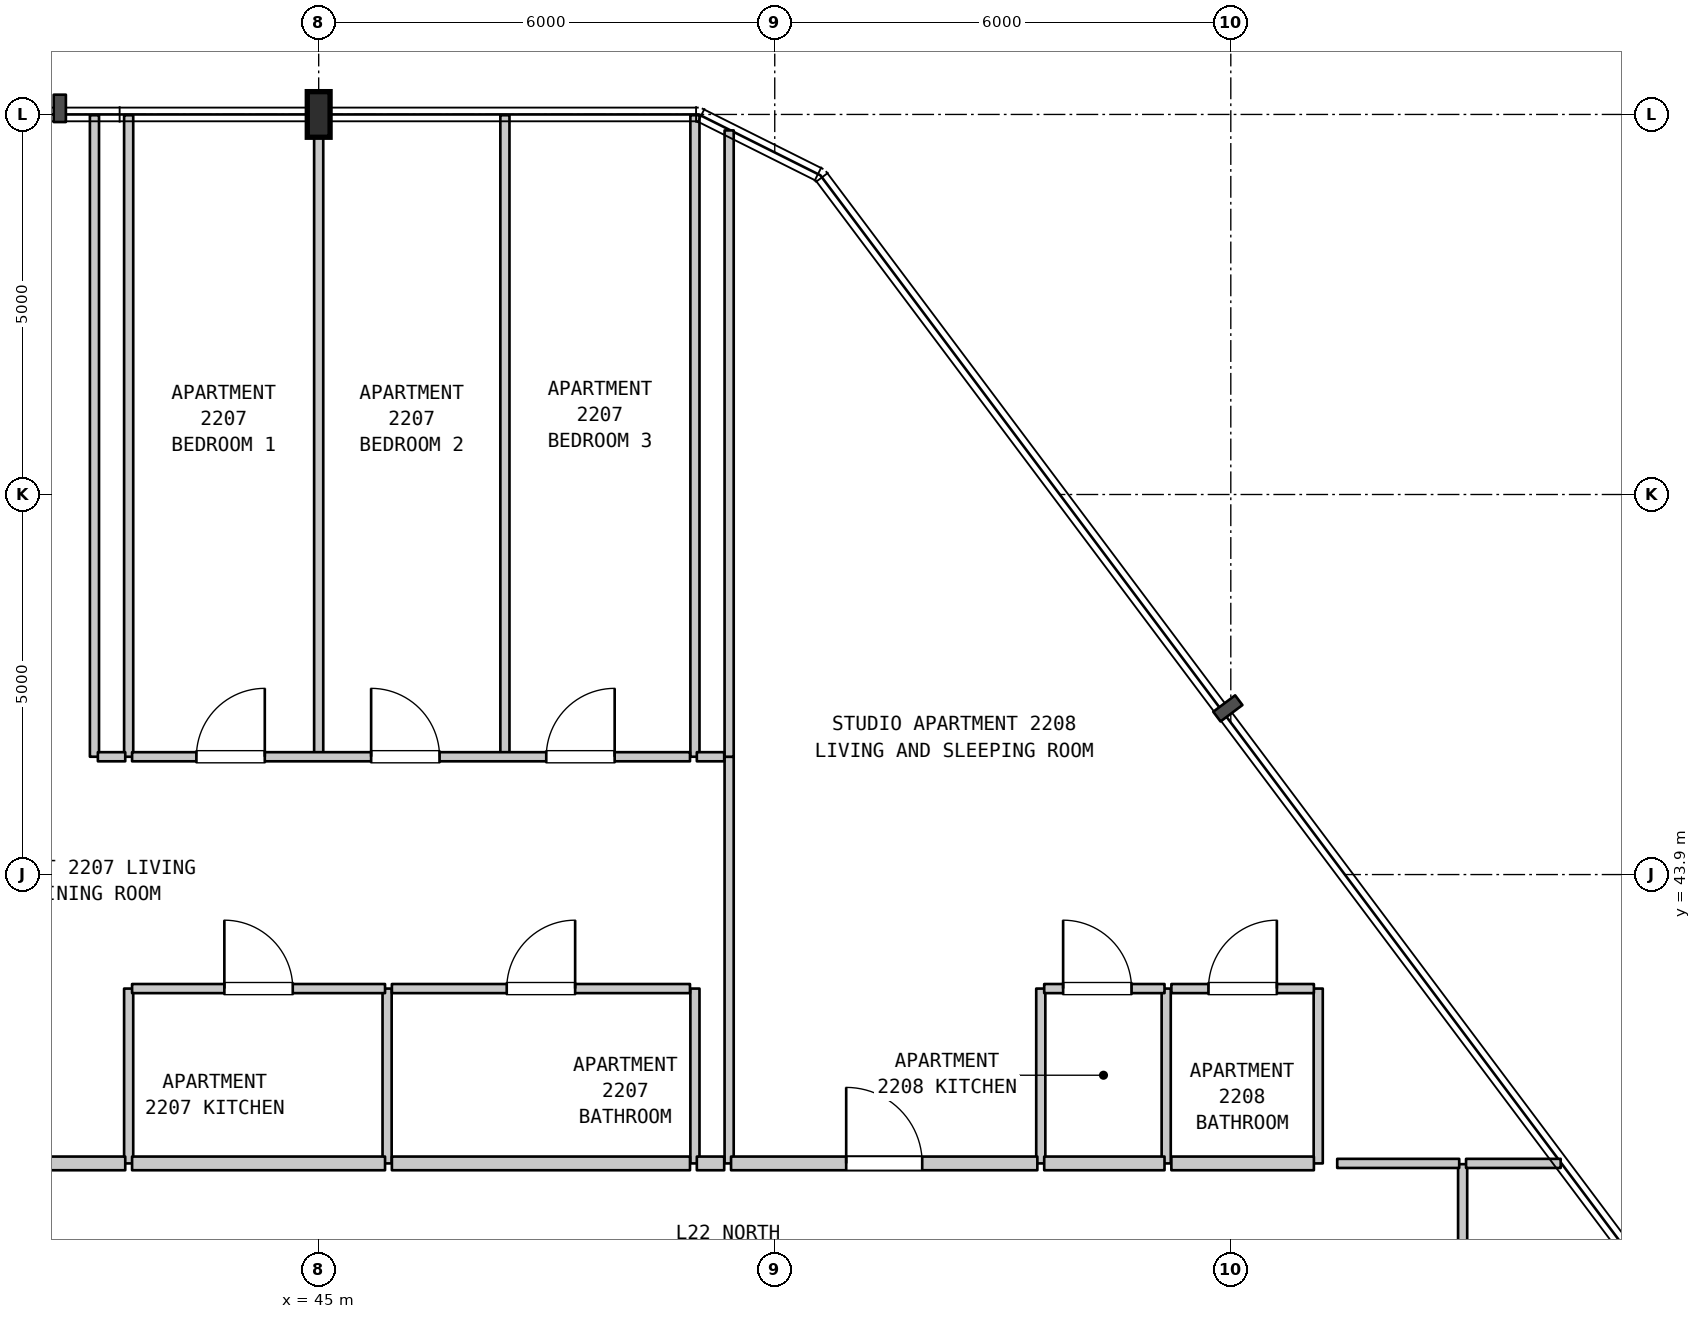
"""IFC4 building model, lengths in metres.
Left out: names, types, materials, properties, quantities, classifications, styles, units other than length and angle.
Written with IfcOpenShell. Run it as: python <this file> out.ifc"""

import sys

from ifc_helpers import new_model, si_unit, direction, frame, frame_2d, origin, origin_2d, place, context, subcontext, project, spatial, rectangle, i_section, extrude, element, fill, save


model = new_model("IFC4")
c1 = context("Model", 3, precision=1e-05, world=origin(), true_north=direction((0.0, 1.0)))
c2 = subcontext(c1, "Body", "Model", "MODEL_VIEW")
j1 = project(units=[si_unit("LENGTHUNIT", "METRE"), si_unit("PLANEANGLEUNIT", "RADIAN")], contexts=[c1])
p1 = place(None, origin())
s1 = spatial("IfcSite", under=j1, at=p1, CompositionType="ELEMENT")
p2 = place(p1, origin())
s2 = spatial("IfcBuilding", under=s1, at=p2, CompositionType="ELEMENT")
p3 = place(p2, frame((0.0, 0.0, 94.6)))
s3 = spatial("IfcBuildingStorey", under=s2, at=p3, CompositionType="ELEMENT", Elevation=94.6)
p4 = place(p3, frame((45.0, 53.9, 0.0), z_axis=(0.0, 0.0, 1.0), x_axis=(1.0, 0.0, 0.0)))
e1 = element("IfcColumn", 1, at=p4, inside=s3, PredefinedType="COLUMN", context=c2, shape_type="SweptSolid", body=[
    extrude(i_section(OverallWidth=0.3, OverallDepth=0.6, WebThickness=0.015, FlangeThickness=0.03, FilletRadius=0.027, at=origin_2d()), origin(), (0.0, 0.0, 1.0), 3.7),
])
p5 = place(p3, frame((42.05, 45.45, 0.0), z_axis=(0.0, 0.0, 1.0), x_axis=(0.0, 1.0, 0.0)))
e2 = element("IfcWall", 2, at=p5, inside=s3, PredefinedType="PARTITIONING", context=c2, shape_type="SweptSolid", body=[
    extrude(rectangle(XDim=8.44, YDim=0.12, at=frame_2d((4.22, 0.0))), origin(), (0.0, 0.0, 1.0), 3.385),
])
p6 = place(p3, frame((42.5, 40.1, 0.0), z_axis=(0.0, 0.0, 1.0), x_axis=(0.0, 1.0, 0.0)))
e3 = element("IfcWall", 3, at=p6, inside=s3, PredefinedType="PARTITIONING", context=c2, shape_type="SweptSolid", body=[
    extrude(rectangle(XDim=2.3, YDim=0.12, at=frame_2d((1.15, 0.0))), origin(), (0.0, 0.0, 1.0), 3.385),
])
for number, where, z_axis, x_axis in (
    (4, (42.5, 45.45, 0.0), (0.0, 0.0, 1.0), (0.0, 1.0, 0.0)),
    (5, (45.0, 45.45, 0.0), (0.0, 0.0, 1.0), (0.0, 1.0, 0.0)),
):
    element("IfcWall", number, at=place(p3, frame(where, z_axis=z_axis, x_axis=x_axis)), inside=s3, PredefinedType="PARTITIONING", context=c2, shape_type="SweptSolid", body=[
        extrude(rectangle(XDim=8.44, YDim=0.12, at=frame_2d((4.22, 0.0))), origin(), (0.0, 0.0, 1.0), 3.385),
    ])
p7 = place(p3, frame((45.9, 40.1, 0.0), z_axis=(0.0, 0.0, 1.0), x_axis=(0.0, 1.0, 0.0)))
e6 = element("IfcWall", 6, at=p7, inside=s3, PredefinedType="PARTITIONING", context=c2, shape_type="SweptSolid", body=[
    extrude(rectangle(XDim=2.3, YDim=0.12, at=frame_2d((1.15, 0.0))), origin(), (0.0, 0.0, 1.0), 3.385),
])
p8 = place(p3, frame((47.45, 45.45, 0.0), z_axis=(0.0, 0.0, 1.0), x_axis=(0.0, 1.0, 0.0)))
e7 = element("IfcWall", 7, at=p8, inside=s3, PredefinedType="PARTITIONING", context=c2, shape_type="SweptSolid", body=[
    extrude(rectangle(XDim=8.44, YDim=0.12, at=frame_2d((4.22, 0.0))), origin(), (0.0, 0.0, 1.0), 3.385),
])
p9 = place(p3, frame((49.95, 40.1, 0.0), z_axis=(0.0, 0.0, 1.0), x_axis=(0.0, 1.0, 0.0)))
e8 = element("IfcWall", 8, at=p9, inside=s3, PredefinedType="PARTITIONING", context=c2, shape_type="SweptSolid", body=[
    extrude(rectangle(XDim=2.3, YDim=0.12, at=frame_2d((1.15, 0.0))), origin(), (0.0, 0.0, 1.0), 3.385),
])
p10 = place(p3, frame((49.95, 45.45, 0.0), z_axis=(0.0, 0.0, 1.0), x_axis=(0.0, 1.0, 0.0)))
e9 = element("IfcWall", 9, at=p10, inside=s3, PredefinedType="PARTITIONING", context=c2, shape_type="SweptSolid", body=[
    extrude(rectangle(XDim=8.44, YDim=0.12, at=frame_2d((4.22, 0.0))), origin(), (0.0, 0.0, 1.0), 3.385),
])
p11 = place(p3, frame((50.4, 40.1, 0.0), z_axis=(0.0, 0.0, 1.0), x_axis=(0.0, 1.0, 0.0)))
e10 = element("IfcWall", 10, at=p11, inside=s3, PredefinedType="PARTITIONING", context=c2, shape_type="SweptSolid", body=[
    extrude(rectangle(XDim=5.35, YDim=0.12, at=frame_2d((2.675, 0.0))), origin(), (0.0, 0.0, 1.0), 3.385),
])
p12 = place(p3, frame((50.4, 45.45, 0.0), z_axis=(0.0, 0.0, 1.0), x_axis=(0.0, 1.0, 0.0)))
e11 = element("IfcWall", 11, at=p12, inside=s3, PredefinedType="PARTITIONING", context=c2, shape_type="SweptSolid", body=[
    extrude(rectangle(XDim=8.24, YDim=0.12, at=frame_2d((4.12, 0.0))), origin(), (0.0, 0.0, 1.0), 3.385),
])
for number, where, z_axis, x_axis in (
    (12, (54.5, 40.1, 0.0), (0.0, 0.0, 1.0), (0.0, 1.0, 0.0)),
    (13, (56.15, 40.1, 0.0), (0.0, 0.0, 1.0), (0.0, 1.0, 0.0)),
    (14, (58.15, 40.1, 0.0), (0.0, 0.0, 1.0), (0.0, 1.0, 0.0)),
):
    element("IfcWall", number, at=place(p3, frame(where, z_axis=z_axis, x_axis=x_axis)), inside=s3, PredefinedType="PARTITIONING", context=c2, shape_type="SweptSolid", body=[
        extrude(rectangle(XDim=2.3, YDim=0.12, at=frame_2d((1.15, 0.0))), origin(), (0.0, 0.0, 1.0), 3.385),
    ])
p13 = place(p3, frame((60.05, 37.89, 0.0), z_axis=(0.0, 0.0, 1.0), x_axis=(0.0, 1.0, 0.0)))
e15 = element("IfcWall", 15, at=p13, inside=s3, PredefinedType="PARTITIONING", context=c2, shape_type="SweptSolid", body=[
    extrude(rectangle(XDim=2.2, YDim=0.12, at=frame_2d((1.1, 0.0))), origin(), (0.0, 0.0, 1.0), 3.385),
])
p14 = place(p3, frame((37.155, 40.1, 0.0), z_axis=(0.0, 0.0, 1.0), x_axis=(1.0, 0.0, 0.0)))
e16 = element("IfcWall", 16, at=p14, inside=s3, PredefinedType="STANDARD", context=c2, shape_type="SweptSolid", body=[
    extrude(rectangle(XDim=5.3, YDim=0.18, at=frame_2d((2.65, 0.0))), origin(), (0.0, 0.0, 1.0), 3.385),
])
p15 = place(p14, frame((2.15, 0.0, 0.0)))
e17 = element("IfcOpeningElement", 17, at=p15, cuts=e16, PredefinedType="OPENING", context=c2, shape_type="SweptSolid", body=[
    extrude(rectangle(XDim=1.0, YDim=2.15, at=frame_2d((0.5, 1.075))), frame((0.0, 0.1, 0.0), z_axis=(0.0, -1.0, 0.0), x_axis=(1.0, 0.0, 0.0)), (0.0, 0.0, 1.0), 0.2),
])
p16 = place(p3, frame((42.545, 40.1, 0.0), z_axis=(0.0, 0.0, 1.0), x_axis=(1.0, 0.0, 0.0)))
e18 = element("IfcWall", 18, at=p16, inside=s3, PredefinedType="STANDARD", context=c2, shape_type="SweptSolid", body=[
    extrude(rectangle(XDim=3.328, YDim=0.18, at=frame_2d((1.664, 0.0))), origin(), (0.0, 0.0, 1.0), 3.385),
])
p17 = place(p3, frame((45.963, 40.1, 0.0), z_axis=(0.0, 0.0, 1.0), x_axis=(1.0, 0.0, 0.0)))
e19 = element("IfcWall", 19, at=p17, inside=s3, PredefinedType="STANDARD", context=c2, shape_type="SweptSolid", body=[
    extrude(rectangle(XDim=3.922, YDim=0.18, at=frame_2d((1.961, 0.0))), origin(), (0.0, 0.0, 1.0), 3.385),
])
p18 = place(p3, frame((49.975, 40.1, 0.0), z_axis=(0.0, 0.0, 1.0), x_axis=(1.0, 0.0, 0.0)))
e20 = element("IfcWall", 20, at=p18, inside=s3, PredefinedType="STANDARD", context=c2, shape_type="SweptSolid", body=[
    extrude(rectangle(XDim=0.36, YDim=0.18, at=frame_2d((0.18, 0.0))), origin(), (0.0, 0.0, 1.0), 3.385),
])
p19 = place(p3, frame((50.425, 40.1, 0.0), z_axis=(0.0, 0.0, 1.0), x_axis=(1.0, 0.0, 0.0)))
e21 = element("IfcWall", 21, at=p19, inside=s3, PredefinedType="STANDARD", context=c2, shape_type="SweptSolid", body=[
    extrude(rectangle(XDim=4.03, YDim=0.18, at=frame_2d((2.015, 0.0))), origin(), (0.0, 0.0, 1.0), 3.385),
])
p20 = place(p19, frame((1.515, 0.0, 0.0)))
e22 = element("IfcOpeningElement", 22, at=p20, cuts=e21, PredefinedType="OPENING", context=c2, shape_type="SweptSolid", body=[
    extrude(rectangle(XDim=1.0, YDim=2.15, at=frame_2d((0.5, 1.075))), frame((0.0, 0.1, 0.0), z_axis=(0.0, -1.0, 0.0), x_axis=(1.0, 0.0, 0.0)), (0.0, 0.0, 1.0), 0.2),
])
p21 = place(p3, frame((54.545, 40.1, 0.0), z_axis=(0.0, 0.0, 1.0), x_axis=(1.0, 0.0, 0.0)))
e23 = element("IfcWall", 23, at=p21, inside=s3, PredefinedType="STANDARD", context=c2, shape_type="SweptSolid", body=[
    extrude(rectangle(XDim=1.583, YDim=0.18, at=frame_2d((0.792, 0.0))), origin(), (0.0, 0.0, 1.0), 3.385),
])
p22 = place(p3, frame((56.218, 40.1, 0.0), z_axis=(0.0, 0.0, 1.0), x_axis=(1.0, 0.0, 0.0)))
e24 = element("IfcWall", 24, at=p22, inside=s3, PredefinedType="STANDARD", context=c2, shape_type="SweptSolid", body=[
    extrude(rectangle(XDim=1.875, YDim=0.18, at=frame_2d((0.938, 0.0))), origin(), (0.0, 0.0, 1.0), 3.385),
])
p23 = place(p3, frame((58.4, 40.1, 0.0), z_axis=(0.0, 0.0, 1.0), x_axis=(1.0, 0.0, 0.0)))
e25 = element("IfcWall", 25, at=p23, inside=s3, PredefinedType="PARTITIONING", context=c2, shape_type="SweptSolid", body=[
    extrude(rectangle(XDim=1.605, YDim=0.12, at=frame_2d((0.802, 0.0))), origin(), (0.0, 0.0, 1.0), 3.385),
])
p24 = place(p3, frame((60.095, 40.1, 0.0), z_axis=(0.0, 0.0, 1.0), x_axis=(1.0, 0.0, 0.0)))
e26 = element("IfcWall", 26, at=p24, inside=s3, PredefinedType="PARTITIONING", context=c2, shape_type="SweptSolid", body=[
    extrude(rectangle(XDim=1.245, YDim=0.12, at=frame_2d((0.623, 0.0))), origin(), (0.0, 0.0, 1.0), 3.385),
])
p25 = place(p3, frame((42.545, 42.4, 0.0), z_axis=(0.0, 0.0, 1.0), x_axis=(1.0, 0.0, 0.0)))
e27 = element("IfcWall", 27, at=p25, inside=s3, PredefinedType="PARTITIONING", context=c2, shape_type="SweptSolid", body=[
    extrude(rectangle(XDim=3.328, YDim=0.12, at=frame_2d((1.664, 0.0))), origin(), (0.0, 0.0, 1.0), 3.385),
])
p26 = place(p25, frame((1.214, 0.0, 0.0)))
e28 = element("IfcOpeningElement", 28, at=p26, cuts=e27, PredefinedType="OPENING", context=c2, shape_type="SweptSolid", body=[
    extrude(rectangle(XDim=0.9, YDim=2.15, at=frame_2d((0.45, 1.075))), frame((0.0, 0.07, 0.0), z_axis=(0.0, -1.0, 0.0), x_axis=(1.0, 0.0, 0.0)), (0.0, 0.0, 1.0), 0.14),
])
p27 = place(p3, frame((45.963, 42.4, 0.0), z_axis=(0.0, 0.0, 1.0), x_axis=(1.0, 0.0, 0.0)))
e29 = element("IfcWall", 29, at=p27, inside=s3, PredefinedType="PARTITIONING", context=c2, shape_type="SweptSolid", body=[
    extrude(rectangle(XDim=3.922, YDim=0.12, at=frame_2d((1.961, 0.0))), origin(), (0.0, 0.0, 1.0), 3.385),
])
p28 = place(p27, frame((1.511, 0.0, 0.0)))
e30 = element("IfcOpeningElement", 30, at=p28, cuts=e29, PredefinedType="OPENING", context=c2, shape_type="SweptSolid", body=[
    extrude(rectangle(XDim=0.9, YDim=2.1, at=frame_2d((0.45, 1.05))), frame((0.0, 0.07, 0.0), z_axis=(0.0, -1.0, 0.0), x_axis=(1.0, 0.0, 0.0)), (0.0, 0.0, 1.0), 0.14),
])
p29 = place(p3, frame((54.545, 42.4, 0.0), z_axis=(0.0, 0.0, 1.0), x_axis=(1.0, 0.0, 0.0)))
e31 = element("IfcWall", 31, at=p29, inside=s3, PredefinedType="PARTITIONING", context=c2, shape_type="SweptSolid", body=[
    extrude(rectangle(XDim=1.583, YDim=0.12, at=frame_2d((0.792, 0.0))), origin(), (0.0, 0.0, 1.0), 3.385),
])
p30 = place(p29, frame((0.249, 0.0, 0.0)))
e32 = element("IfcOpeningElement", 32, at=p30, cuts=e31, PredefinedType="OPENING", context=c2, shape_type="SweptSolid", body=[
    extrude(rectangle(XDim=0.9, YDim=2.15, at=frame_2d((0.45, 1.075))), frame((0.0, 0.07, 0.0), z_axis=(0.0, -1.0, 0.0), x_axis=(1.0, 0.0, 0.0)), (0.0, 0.0, 1.0), 0.14),
])
p31 = place(p3, frame((56.218, 42.4, 0.0), z_axis=(0.0, 0.0, 1.0), x_axis=(1.0, 0.0, 0.0)))
e33 = element("IfcWall", 33, at=p31, inside=s3, PredefinedType="PARTITIONING", context=c2, shape_type="SweptSolid", body=[
    extrude(rectangle(XDim=1.875, YDim=0.12, at=frame_2d((0.938, 0.0))), origin(), (0.0, 0.0, 1.0), 3.385),
])
p32 = place(p31, frame((0.488, 0.0, 0.0)))
e34 = element("IfcOpeningElement", 34, at=p32, cuts=e33, PredefinedType="OPENING", context=c2, shape_type="SweptSolid", body=[
    extrude(rectangle(XDim=0.9, YDim=2.1, at=frame_2d((0.45, 1.05))), frame((0.0, 0.07, 0.0), z_axis=(0.0, -1.0, 0.0), x_axis=(1.0, 0.0, 0.0)), (0.0, 0.0, 1.0), 0.14),
])
p33 = place(p3, frame((42.095, 45.45, 0.0), z_axis=(0.0, 0.0, 1.0), x_axis=(1.0, 0.0, 0.0)))
e35 = element("IfcWall", 35, at=p33, inside=s3, PredefinedType="PARTITIONING", context=c2, shape_type="SweptSolid", body=[
    extrude(rectangle(XDim=0.36, YDim=0.12, at=frame_2d((0.18, 0.0))), origin(), (0.0, 0.0, 1.0), 3.385),
])
p34 = place(p3, frame((42.545, 45.45, 0.0), z_axis=(0.0, 0.0, 1.0), x_axis=(1.0, 0.0, 0.0)))
e36 = element("IfcWall", 36, at=p34, inside=s3, PredefinedType="PARTITIONING", context=c2, shape_type="SweptSolid", body=[
    extrude(rectangle(XDim=7.34, YDim=0.12, at=frame_2d((3.67, 0.0))), origin(), (0.0, 0.0, 1.0), 3.385),
])
p35 = place(p34, frame((0.846, 0.0, 0.0)))
e37 = element("IfcOpeningElement", 37, at=p35, cuts=e36, PredefinedType="OPENING", context=c2, shape_type="SweptSolid", body=[
    extrude(rectangle(XDim=0.9, YDim=2.15, at=frame_2d((0.45, 1.075))), frame((0.0, 0.07, 0.0), z_axis=(0.0, -1.0, 0.0), x_axis=(1.0, 0.0, 0.0)), (0.0, 0.0, 1.0), 0.14),
])
p36 = place(p34, frame((3.145, 0.0, 0.0)))
e38 = element("IfcOpeningElement", 38, at=p36, cuts=e36, PredefinedType="OPENING", context=c2, shape_type="SweptSolid", body=[
    extrude(rectangle(XDim=0.9, YDim=2.15, at=frame_2d((0.45, 1.075))), frame((0.0, 0.07, 0.0), z_axis=(0.0, -1.0, 0.0), x_axis=(1.0, 0.0, 0.0)), (0.0, 0.0, 1.0), 0.14),
])
p37 = place(p34, frame((5.449, 0.0, 0.0)))
e39 = element("IfcOpeningElement", 39, at=p37, cuts=e36, PredefinedType="OPENING", context=c2, shape_type="SweptSolid", body=[
    extrude(rectangle(XDim=0.9, YDim=2.15, at=frame_2d((0.45, 1.075))), frame((0.0, 0.07, 0.0), z_axis=(0.0, -1.0, 0.0), x_axis=(1.0, 0.0, 0.0)), (0.0, 0.0, 1.0), 0.14),
])
p38 = place(p3, frame((49.975, 45.45, 0.0), z_axis=(0.0, 0.0, 1.0), x_axis=(1.0, 0.0, 0.0)))
e40 = element("IfcWall", 40, at=p38, inside=s3, PredefinedType="PARTITIONING", context=c2, shape_type="SweptSolid", body=[
    extrude(rectangle(XDim=0.36, YDim=0.12, at=frame_2d((0.18, 0.0))), origin(), (0.0, 0.0, 1.0), 3.385),
])
p39 = place(p20, origin())
e41 = element("IfcDoor", 41, at=p39, inside=s3, OperationType="SINGLE_SWING_LEFT", PredefinedType="DOOR", context=c2, shape_type="SweptSolid", body=[
    extrude(rectangle(XDim=1.0, YDim=2.15, at=frame_2d((0.5, 1.075))), frame((0.0, 0.025, 0.0), z_axis=(0.0, -1.0, 0.0), x_axis=(1.0, 0.0, 0.0)), (0.0, 0.0, 1.0), 0.05),
])
fill(e22, e41)
p40 = place(p26, origin())
e42 = element("IfcDoor", 42, at=p40, inside=s3, OperationType="SINGLE_SWING_LEFT", PredefinedType="DOOR", context=c2, shape_type="SweptSolid", body=[
    extrude(rectangle(XDim=0.9, YDim=2.15, at=frame_2d((0.45, 1.075))), frame((0.0, 0.025, 0.0), z_axis=(0.0, -1.0, 0.0), x_axis=(1.0, 0.0, 0.0)), (0.0, 0.0, 1.0), 0.05),
])
fill(e28, e42)
p41 = place(p28, origin())
e43 = element("IfcDoor", 43, at=p41, inside=s3, OperationType="SINGLE_SWING_RIGHT", PredefinedType="DOOR", context=c2, shape_type="SweptSolid", body=[
    extrude(rectangle(XDim=0.9, YDim=2.1, at=frame_2d((0.45, 1.05))), frame((0.0, 0.025, 0.0), z_axis=(0.0, -1.0, 0.0), x_axis=(1.0, 0.0, 0.0)), (0.0, 0.0, 1.0), 0.05),
])
fill(e30, e43)
p42 = place(p30, origin())
e44 = element("IfcDoor", 44, at=p42, inside=s3, OperationType="SINGLE_SWING_LEFT", PredefinedType="DOOR", context=c2, shape_type="SweptSolid", body=[
    extrude(rectangle(XDim=0.9, YDim=2.15, at=frame_2d((0.45, 1.075))), frame((0.0, 0.025, 0.0), z_axis=(0.0, -1.0, 0.0), x_axis=(1.0, 0.0, 0.0)), (0.0, 0.0, 1.0), 0.05),
])
fill(e32, e44)
p43 = place(p32, origin())
e45 = element("IfcDoor", 45, at=p43, inside=s3, OperationType="SINGLE_SWING_RIGHT", PredefinedType="DOOR", context=c2, shape_type="SweptSolid", body=[
    extrude(rectangle(XDim=0.9, YDim=2.1, at=frame_2d((0.45, 1.05))), frame((0.0, 0.025, 0.0), z_axis=(0.0, -1.0, 0.0), x_axis=(1.0, 0.0, 0.0)), (0.0, 0.0, 1.0), 0.05),
])
fill(e34, e45)
p44 = place(p35, origin())
e46 = element("IfcDoor", 46, at=p44, inside=s3, OperationType="SINGLE_SWING_RIGHT", PredefinedType="DOOR", context=c2, shape_type="SweptSolid", body=[
    extrude(rectangle(XDim=0.9, YDim=2.15, at=frame_2d((0.45, 1.075))), frame((0.0, 0.025, 0.0), z_axis=(0.0, -1.0, 0.0), x_axis=(1.0, 0.0, 0.0)), (0.0, 0.0, 1.0), 0.05),
])
fill(e37, e46)
p45 = place(p36, origin())
e47 = element("IfcDoor", 47, at=p45, inside=s3, OperationType="SINGLE_SWING_LEFT", PredefinedType="DOOR", context=c2, shape_type="SweptSolid", body=[
    extrude(rectangle(XDim=0.9, YDim=2.15, at=frame_2d((0.45, 1.075))), frame((0.0, 0.025, 0.0), z_axis=(0.0, -1.0, 0.0), x_axis=(1.0, 0.0, 0.0)), (0.0, 0.0, 1.0), 0.05),
])
fill(e38, e47)
p46 = place(p37, origin())
e48 = element("IfcDoor", 48, at=p46, inside=s3, OperationType="SINGLE_SWING_RIGHT", PredefinedType="DOOR", context=c2, shape_type="SweptSolid", body=[
    extrude(rectangle(XDim=0.9, YDim=2.15, at=frame_2d((0.45, 1.075))), frame((0.0, 0.025, 0.0), z_axis=(0.0, -1.0, 0.0), x_axis=(1.0, 0.0, 0.0)), (0.0, 0.0, 1.0), 0.05),
])
fill(e39, e48)
save(model, sys.argv[1])
